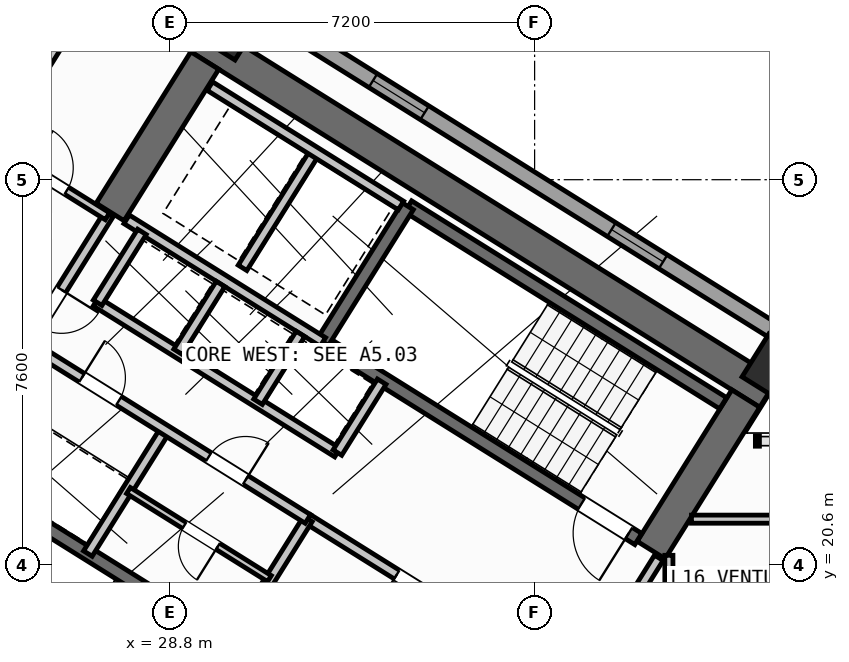
"""IFC4 building model, lengths in metres.
Left out: names, types, materials, properties, quantities, classifications, styles, units other than length and angle.
Written with IfcOpenShell. Run it as: python <this file> out.ifc"""

import sys

from ifc_helpers import new_model, si_unit, direction, frame, frame_2d, origin, origin_2d, place, context, subcontext, project, spatial, rectangle, hollow_rectangle, extrude, source, transform, mapped, element, fill, save


model = new_model("IFC4")
c1 = context("Model", 3, precision=1e-05, world=origin(), true_north=direction((0.0, 1.0)))
c2 = subcontext(c1, "Body", "Model", "MODEL_VIEW")
j1 = project(units=[si_unit("LENGTHUNIT", "METRE"), si_unit("PLANEANGLEUNIT", "RADIAN")], contexts=[c1])
p1 = place(None, origin())
s1 = spatial("IfcSite", under=j1, at=p1, CompositionType="ELEMENT")
p2 = place(p1, origin())
s2 = spatial("IfcBuilding", under=s1, at=p2, CompositionType="ELEMENT")
p3 = place(p2, frame((0.0, 0.0, 63.6)))
s3 = spatial("IfcBuildingStorey", under=s2, at=p3, CompositionType="ELEMENT", Elevation=63.6)
p4 = place(p3, frame((40.615, 23.983, 0.0), z_axis=(0.0, 0.0, 1.0), x_axis=(-0.848045953968, 0.529922692436, 0.0)))
e1 = element("IfcWall", 1, at=p4, inside=s3, PredefinedType="SHEAR", context=c2, shape_type="SweptSolid", body=[
    extrude(rectangle(XDim=13.24, YDim=0.65, at=frame_2d((6.62, 0.0))), origin(), (0.0, 0.0, 1.0), 3.35),
])
for number, where, z_axis, x_axis in (
    (2, (40.168, 23.88, 0.0), (0.0, 0.0, 1.0), (-0.53, -0.848, 0.0)),
    (3, (29.491, 30.552, 0.0), (0.0, 0.0, 1.0), (-0.53, -0.848, 0.0)),
):
    element("IfcWall", number, at=place(p3, frame(where, z_axis=z_axis, x_axis=x_axis)), inside=s3, PredefinedType="SHEAR", context=c2, shape_type="SweptSolid", body=[
        extrude(rectangle(XDim=3.525, YDim=0.65, at=frame_2d((1.763, 0.0))), origin(), (0.0, 0.0, 1.0), 3.35),
    ])
m1 = source(origin(), c2, "Body", "SweptSolid", [
    extrude(hollow_rectangle(XDim=1.0, YDim=1.0, WallThickness=0.04, at=origin_2d()), origin(), (0.0, 0.0, 1.0), 3.6),
])
for number, where, z_axis, x_axis in (
    (4, (40.783, 24.469, 0.0), (0.0, 0.0, 1.0), (-0.848, 0.53, 0.0)),
    (5, (29.928, 31.251, 0.0), (0.0, 0.0, 1.0), (-0.848, 0.53, 0.0)),
):
    element("IfcColumn", number, at=place(p3, frame(where, z_axis=z_axis, x_axis=x_axis)), inside=s3, PredefinedType="COLUMN", context=c2, shape_type="MappedRepresentation", body=[
        mapped(m1, transform((0.0, 0.0, 0.0), scale=1.0)),
    ])
p5 = place(p3, frame((29.268, 6.429, 0.0), z_axis=(0.0, 0.0, 1.0), x_axis=(-0.848049971435, 0.529916263149, 0.0)))
e6 = element("IfcWall", 6, at=p5, inside=s3, PredefinedType="STANDARD", context=c2, shape_type="SweptSolid", body=[
    extrude(rectangle(XDim=31.588, YDim=0.32, at=frame_2d((15.794, 0.0))), origin(), (0.0, 0.0, 1.0), 3.35),
])
p6 = place(p5, frame((16.362, 0.0, 0.0)))
e7 = element("IfcOpeningElement", 7, at=p6, cuts=e6, PredefinedType="OPENING", context=c2, shape_type="SweptSolid", body=[
    extrude(rectangle(XDim=1.2, YDim=2.15, at=frame_2d((0.6, 1.075))), frame((0.0, 0.17, 0.0), z_axis=(0.0, -1.0, 0.0), x_axis=(1.0, 0.0, 0.0)), (0.0, 0.0, 1.0), 0.34),
])
p7 = place(p5, frame((2.989, 0.0, 0.8)))
e8 = element("IfcOpeningElement", 8, at=p7, cuts=e6, PredefinedType="OPENING", context=c2, shape_type="SweptSolid", body=[
    extrude(rectangle(XDim=2.1, YDim=1.55, at=frame_2d((1.05, 0.775))), frame((0.0, 0.17, 0.0), z_axis=(0.0, -1.0, 0.0), x_axis=(1.0, 0.0, 0.0)), (0.0, 0.0, 1.0), 0.34),
])
p8 = place(p5, frame((8.359, 0.0, 0.8)))
e9 = element("IfcOpeningElement", 9, at=p8, cuts=e6, PredefinedType="OPENING", context=c2, shape_type="SweptSolid", body=[
    extrude(rectangle(XDim=2.1, YDim=1.55, at=frame_2d((1.05, 0.775))), frame((0.0, 0.17, 0.0), z_axis=(0.0, -1.0, 0.0), x_axis=(1.0, 0.0, 0.0)), (0.0, 0.0, 1.0), 0.34),
])
p9 = place(p5, frame((13.284, 0.0, 0.95)))
e10 = element("IfcOpeningElement", 10, at=p9, cuts=e6, PredefinedType="OPENING", context=c2, shape_type="SweptSolid", body=[
    extrude(rectangle(XDim=1.2, YDim=1.4, at=frame_2d((0.6, 0.7))), frame((0.0, 0.17, 0.0), z_axis=(0.0, -1.0, 0.0), x_axis=(1.0, 0.0, 0.0)), (0.0, 0.0, 1.0), 0.34),
])
p10 = place(p5, frame((29.188, 0.0, 0.95)))
e11 = element("IfcOpeningElement", 11, at=p10, cuts=e6, PredefinedType="OPENING", context=c2, shape_type="SweptSolid", body=[
    extrude(rectangle(XDim=1.2, YDim=1.4, at=frame_2d((0.6, 0.7))), frame((0.0, 0.17, 0.0), z_axis=(0.0, -1.0, 0.0), x_axis=(1.0, 0.0, 0.0)), (0.0, 0.0, 1.0), 0.34),
])
p11 = place(p5, frame((19.11, 0.0, 1.0)))
e12 = element("IfcOpeningElement", 12, at=p11, cuts=e6, PredefinedType="OPENING", context=c2, shape_type="SweptSolid", body=[
    extrude(rectangle(XDim=0.9, YDim=1.25, at=frame_2d((0.45, 0.625))), frame((0.0, 0.17, 0.0), z_axis=(0.0, -1.0, 0.0), x_axis=(1.0, 0.0, 0.0)), (0.0, 0.0, 1.0), 0.34),
])
p12 = place(p5, frame((21.226, 0.0, 1.0)))
e13 = element("IfcOpeningElement", 13, at=p12, cuts=e6, PredefinedType="OPENING", context=c2, shape_type="SweptSolid", body=[
    extrude(rectangle(XDim=0.9, YDim=1.25, at=frame_2d((0.45, 0.625))), frame((0.0, 0.17, 0.0), z_axis=(0.0, -1.0, 0.0), x_axis=(1.0, 0.0, 0.0)), (0.0, 0.0, 1.0), 0.34),
])
p13 = place(p5, frame((23.014, 0.0, 1.0)))
e14 = element("IfcOpeningElement", 14, at=p13, cuts=e6, PredefinedType="OPENING", context=c2, shape_type="SweptSolid", body=[
    extrude(rectangle(XDim=0.9, YDim=1.25, at=frame_2d((0.45, 0.625))), frame((0.0, 0.17, 0.0), z_axis=(0.0, -1.0, 0.0), x_axis=(1.0, 0.0, 0.0)), (0.0, 0.0, 1.0), 0.34),
])
p14 = place(p5, frame((24.802, 0.0, 1.0)))
e15 = element("IfcOpeningElement", 15, at=p14, cuts=e6, PredefinedType="OPENING", context=c2, shape_type="SweptSolid", body=[
    extrude(rectangle(XDim=0.9, YDim=1.25, at=frame_2d((0.45, 0.625))), frame((0.0, 0.17, 0.0), z_axis=(0.0, -1.0, 0.0), x_axis=(1.0, 0.0, 0.0)), (0.0, 0.0, 1.0), 0.34),
])
p15 = place(p5, frame((26.59, 0.0, 1.0)))
e16 = element("IfcOpeningElement", 16, at=p15, cuts=e6, PredefinedType="OPENING", context=c2, shape_type="SweptSolid", body=[
    extrude(rectangle(XDim=0.9, YDim=1.25, at=frame_2d((0.45, 0.625))), frame((0.0, 0.17, 0.0), z_axis=(0.0, -1.0, 0.0), x_axis=(1.0, 0.0, 0.0)), (0.0, 0.0, 1.0), 0.34),
])
p16 = place(p3, frame((14.138, 41.825, 0.0), z_axis=(0.0, 0.0, 1.0), x_axis=(0.848046498049, -0.529921821731, 0.0)))
e17 = element("IfcWall", 17, at=p16, inside=s3, PredefinedType="STANDARD", context=c2, shape_type="SweptSolid", body=[
    extrude(rectangle(XDim=31.588, YDim=0.32, at=frame_2d((15.794, 0.0))), origin(), (0.0, 0.0, 1.0), 3.35),
])
p17 = place(p16, frame((2.526, 0.0, 0.0)))
e18 = element("IfcOpeningElement", 18, at=p17, cuts=e17, PredefinedType="OPENING", context=c2, shape_type="SweptSolid", body=[
    extrude(rectangle(XDim=1.05, YDim=2.15, at=frame_2d((0.525, 1.075))), frame((0.0, 0.17, 0.0), z_axis=(0.0, -1.0, 0.0), x_axis=(1.0, 0.0, 0.0)), (0.0, 0.0, 1.0), 0.34),
])
p18 = place(p16, frame((0.825, 0.0, 0.95)))
e19 = element("IfcOpeningElement", 19, at=p18, cuts=e17, PredefinedType="OPENING", context=c2, shape_type="SweptSolid", body=[
    extrude(rectangle(XDim=1.2, YDim=1.4, at=frame_2d((0.6, 0.7))), frame((0.0, 0.17, 0.0), z_axis=(0.0, -1.0, 0.0), x_axis=(1.0, 0.0, 0.0)), (0.0, 0.0, 1.0), 0.34),
])
p19 = place(p16, frame((9.502, 0.0, 0.85)))
e20 = element("IfcOpeningElement", 20, at=p19, cuts=e17, PredefinedType="OPENING", context=c2, shape_type="SweptSolid", body=[
    extrude(rectangle(XDim=1.8, YDim=1.5, at=frame_2d((0.9, 0.75))), frame((0.0, 0.17, 0.0), z_axis=(0.0, -1.0, 0.0), x_axis=(1.0, 0.0, 0.0)), (0.0, 0.0, 1.0), 0.34),
])
p20 = place(p16, frame((13.899, 0.0, 0.85)))
e21 = element("IfcOpeningElement", 21, at=p20, cuts=e17, PredefinedType="OPENING", context=c2, shape_type="SweptSolid", body=[
    extrude(rectangle(XDim=1.5, YDim=1.5, at=frame_2d((0.75, 0.75))), frame((0.0, 0.17, 0.0), z_axis=(0.0, -1.0, 0.0), x_axis=(1.0, 0.0, 0.0)), (0.0, 0.0, 1.0), 0.34),
])
p21 = place(p16, frame((22.019, 0.0, 0.95)))
e22 = element("IfcOpeningElement", 22, at=p21, cuts=e17, PredefinedType="OPENING", context=c2, shape_type="SweptSolid", body=[
    extrude(rectangle(XDim=1.2, YDim=1.4, at=frame_2d((0.6, 0.7))), frame((0.0, 0.17, 0.0), z_axis=(0.0, -1.0, 0.0), x_axis=(1.0, 0.0, 0.0)), (0.0, 0.0, 1.0), 0.34),
])
p22 = place(p16, frame((27.569, 0.0, 0.95)))
e23 = element("IfcOpeningElement", 23, at=p22, cuts=e17, PredefinedType="OPENING", context=c2, shape_type="SweptSolid", body=[
    extrude(rectangle(XDim=1.2, YDim=1.4, at=frame_2d((0.6, 0.7))), frame((0.0, 0.17, 0.0), z_axis=(0.0, -1.0, 0.0), x_axis=(1.0, 0.0, 0.0)), (0.0, 0.0, 1.0), 0.34),
])
p23 = place(p3, frame((31.28, 18.261, 0.0), z_axis=(0.0, 0.0, 1.0), x_axis=(-0.848051618787, 0.529913626805, 0.0)))
e24 = element("IfcWall", 24, at=p23, inside=s3, PredefinedType="SHEAR", context=c2, shape_type="SweptSolid", body=[
    extrude(rectangle(XDim=7.46, YDim=0.26, at=frame_2d((3.73, 0.0))), origin(), (0.0, 0.0, 1.0), 3.35),
])
p24 = place(p23, frame((0.36, 0.0, 0.0)))
e25 = element("IfcOpeningElement", 25, at=p24, cuts=e24, PredefinedType="OPENING", context=c2, shape_type="SweptSolid", body=[
    extrude(rectangle(XDim=0.86, YDim=2.05, at=frame_2d((0.43, 1.025))), frame((0.0, 0.14, 0.0), z_axis=(0.0, -1.0, 0.0), x_axis=(1.0, 0.0, 0.0)), (0.0, 0.0, 1.0), 0.28),
])
p25 = place(p3, frame((39.721, 23.788, 0.0), z_axis=(0.0, 0.0, 1.0), x_axis=(-0.848054434086, 0.529909121291, 0.0)))
e26 = element("IfcWall", 26, at=p25, inside=s3, PredefinedType="SHEAR", context=c2, shape_type="SweptSolid", body=[
    extrude(rectangle(XDim=7.33, YDim=0.26, at=frame_2d((3.665, 0.0))), origin(), (0.0, 0.0, 1.0), 3.35),
])
p26 = place(p3, frame((38.046, 21.108, 0.0), z_axis=(0.0, 0.0, 1.0), x_axis=(-0.848054434086, 0.529909121291, 0.0)))
e27 = element("IfcWall", 27, at=p26, inside=s3, PredefinedType="SHEAR", context=c2, shape_type="SweptSolid", body=[
    extrude(rectangle(XDim=7.33, YDim=0.26, at=frame_2d((3.665, 0.0))), origin(), (0.0, 0.0, 1.0), 3.35),
])
p27 = place(p26, frame((0.22, 0.0, 0.0)))
e28 = element("IfcOpeningElement", 28, at=p27, cuts=e27, PredefinedType="OPENING", context=c2, shape_type="SweptSolid", body=[
    extrude(rectangle(XDim=1.1, YDim=2.1, at=frame_2d((0.55, 1.05))), frame((0.0, 0.14, 0.0), z_axis=(0.0, -1.0, 0.0), x_axis=(1.0, 0.0, 0.0)), (0.0, 0.0, 1.0), 0.28),
])
p28 = place(p3, frame((33.496, 27.677, 0.0), z_axis=(0.0, 0.0, 1.0), x_axis=(-0.529908658664, -0.84805472316, 0.0)))
e29 = element("IfcWall", 29, at=p28, inside=s3, PredefinedType="SHEAR", context=c2, shape_type="SweptSolid", body=[
    extrude(rectangle(XDim=3.16, YDim=0.26, at=frame_2d((1.58, 0.0))), origin(), (0.0, 0.0, 1.0), 3.35),
])
p29 = place(p3, frame((36.374, 18.474, 0.0), z_axis=(0.0, 0.0, 1.0), x_axis=(-0.848051071577, 0.529914502535, 0.0)))
e30 = element("IfcWall", 30, at=p29, inside=s3, PredefinedType="STANDARD", context=c2, shape_type="SweptSolid", body=[
    extrude(rectangle(XDim=5.718, YDim=0.2, at=frame_2d((2.859, 0.0))), origin(), (0.0, 0.0, 1.0), 3.34),
])
p30 = place(p29, frame((2.498, 0.0, 0.0)))
e31 = element("IfcOpeningElement", 31, at=p30, cuts=e30, PredefinedType="OPENING", context=c2, shape_type="SweptSolid", body=[
    extrude(rectangle(XDim=1.15, YDim=2.1, at=frame_2d((0.575, 1.05))), frame((0.0, 0.11, 0.0), z_axis=(0.0, -1.0, 0.0), x_axis=(1.0, 0.0, 0.0)), (0.0, 0.0, 1.0), 0.22),
])
p31 = place(p3, frame((31.822, 24.998, 0.0), z_axis=(0.0, 0.0, 1.0), x_axis=(-0.848058348634, 0.529902856485, 0.0)))
e32 = element("IfcWall", 32, at=p31, inside=s3, PredefinedType="STANDARD", context=c2, shape_type="SweptSolid", body=[
    extrude(rectangle(XDim=4.568, YDim=0.2, at=frame_2d((2.284, 0.0))), origin(), (0.0, 0.0, 1.0), 3.34),
])
p32 = place(p3, frame((32.108, 22.814, 0.0), z_axis=(0.0, 0.0, 1.0), x_axis=(-0.848042229521, 0.529928652696, 0.0)))
e33 = element("IfcWall", 33, at=p32, inside=s3, PredefinedType="STANDARD", context=c2, shape_type="SweptSolid", body=[
    extrude(rectangle(XDim=5.62, YDim=0.2, at=frame_2d((2.81, 0.0))), origin(), (0.0, 0.0, 1.0), 3.34),
])
p33 = place(p3, frame((32.982, 24.213, 0.0), z_axis=(0.0, 0.0, 1.0), x_axis=(-0.529839334948, -0.84809803628, 0.0)))
e34 = element("IfcWall", 34, at=p33, inside=s3, PredefinedType="STANDARD", context=c2, shape_type="SweptSolid", body=[
    extrude(rectangle(XDim=1.65, YDim=0.2, at=frame_2d((0.825, 0.0))), origin(), (0.0, 0.0, 1.0), 3.34),
])
p34 = place(p3, frame((28.25, 27.17, 0.0), z_axis=(0.0, 0.0, 1.0), x_axis=(-0.529905827651, -0.848056492117, 0.0)))
e35 = element("IfcWall", 35, at=p34, inside=s3, PredefinedType="STANDARD", context=c2, shape_type="SweptSolid", body=[
    extrude(rectangle(XDim=1.65, YDim=0.2, at=frame_2d((0.825, 0.0))), origin(), (0.0, 0.0, 1.0), 3.34),
])
p35 = place(p3, frame((31.645, 28.716, 0.0), z_axis=(0.0, 0.0, 1.0), x_axis=(-0.52986693015, -0.848080795876, 0.0)))
e36 = element("IfcWall", 36, at=p35, inside=s3, PredefinedType="STANDARD", context=c2, shape_type="SweptSolid", body=[
    extrude(rectangle(XDim=2.66, YDim=0.2, at=frame_2d((1.33, 0.0))), origin(), (0.0, 0.0, 1.0), 3.34),
])
p36 = place(p3, frame((33.363, 27.69, 0.0), z_axis=(0.0, 0.0, 1.0), x_axis=(-0.848053806312, 0.529910125964, 0.0)))
e37 = element("IfcWall", 37, at=p36, inside=s3, PredefinedType="STANDARD", context=c2, shape_type="SweptSolid", body=[
    extrude(rectangle(XDim=4.448, YDim=0.2, at=frame_2d((2.224, 0.0))), origin(), (0.0, 0.0, 1.0), 3.34),
])
for number, where, z_axis, x_axis in (
    (38, (31.379, 25.156, 0.0), (0.0, 0.0, 1.0), (-0.53, -0.848, 0.0)),
    (39, (29.801, 26.142, 0.0), (0.0, 0.0, 1.0), (-0.53, -0.848, 0.0)),
):
    element("IfcWall", number, at=place(p3, frame(where, z_axis=z_axis, x_axis=x_axis)), inside=s3, PredefinedType="STANDARD", context=c2, shape_type="SweptSolid", body=[
        extrude(rectangle(XDim=1.58, YDim=0.2, at=frame_2d((0.79, 0.0))), origin(), (0.0, 0.0, 1.0), 3.34),
    ])
for number, where, z_axis, x_axis in (
    (40, (31.525, 21.504, 0.0), (0.0, 0.0, 1.0), (-0.53, -0.848, 0.0)),
    (41, (28.71, 23.263, 0.0), (0.0, 0.0, 1.0), (-0.53, -0.848, 0.0)),
):
    element("IfcWall", number, at=place(p3, frame(where, z_axis=z_axis, x_axis=x_axis)), inside=s3, PredefinedType="STANDARD", context=c2, shape_type="SweptSolid", body=[
        extrude(rectangle(XDim=2.88, YDim=0.2, at=frame_2d((1.44, 0.0))), origin(), (0.0, 0.0, 1.0), 3.34),
    ])
p37 = place(p3, frame((31.525, 21.504, 0.0), z_axis=(0.0, 0.0, 1.0), x_axis=(-0.848044998614, 0.529924221305, 0.0)))
e42 = element("IfcWall", 42, at=p37, inside=s3, PredefinedType="STANDARD", context=c2, shape_type="SweptSolid", body=[
    extrude(rectangle(XDim=6.168, YDim=0.2, at=frame_2d((3.084, 0.0))), origin(), (0.0, 0.0, 1.0), 3.34),
])
p38 = place(p37, frame((4.4, 0.0, 0.0)))
e43 = element("IfcOpeningElement", 43, at=p38, cuts=e42, PredefinedType="OPENING", context=c2, shape_type="SweptSolid", body=[
    extrude(rectangle(XDim=0.86, YDim=2.05, at=frame_2d((0.43, 1.025))), frame((0.0, 0.11, 0.0), z_axis=(0.0, -1.0, 0.0), x_axis=(1.0, 0.0, 0.0)), (0.0, 0.0, 1.0), 0.22),
])
p39 = place(p37, frame((1.45, 0.0, 0.0)))
e44 = element("IfcOpeningElement", 44, at=p39, cuts=e42, PredefinedType="OPENING", context=c2, shape_type="SweptSolid", body=[
    extrude(rectangle(XDim=0.86, YDim=2.05, at=frame_2d((0.43, 1.025))), frame((0.0, 0.11, 0.0), z_axis=(0.0, -1.0, 0.0), x_axis=(1.0, 0.0, 0.0)), (0.0, 0.0, 1.0), 0.22),
])
p40 = place(p3, frame((30.766, 20.327, 0.0), z_axis=(0.0, 0.0, 1.0), x_axis=(-0.848052663127, 0.529911955482, 0.0)))
e45 = element("IfcWall", 45, at=p40, inside=s3, PredefinedType="PLUMBINGWALL", context=c2, shape_type="SweptSolid", body=[
    extrude(rectangle(XDim=3.28, YDim=0.14, at=frame_2d((1.64, 0.0))), origin(), (0.0, 0.0, 1.0), 3.34),
])
p41 = place(p40, frame((1.2, 0.0, 0.0)))
e46 = element("IfcOpeningElement", 46, at=p41, cuts=e45, PredefinedType="OPENING", context=c2, shape_type="SweptSolid", body=[
    extrude(rectangle(XDim=0.78, YDim=2.05, at=frame_2d((0.39, 1.025))), frame((0.0, 0.08, 0.0), z_axis=(0.0, -1.0, 0.0), x_axis=(1.0, 0.0, 0.0)), (0.0, 0.0, 1.0), 0.16),
])
p42 = place(p3, frame((27.596, 27.52, 0.0), z_axis=(0.0, 0.0, 1.0), x_axis=(-0.529865479138, -0.848081702443, 0.0)))
e47 = element("IfcWall", 47, at=p42, inside=s3, PredefinedType="STANDARD", context=c2, shape_type="SweptSolid", body=[
    extrude(rectangle(XDim=2.96, YDim=0.2, at=frame_2d((1.48, 0.0))), origin(), (0.0, 0.0, 1.0), 3.34),
])
p43 = place(p42, frame((1.76, 0.0, 0.0)))
e48 = element("IfcOpeningElement", 48, at=p43, cuts=e47, PredefinedType="OPENING", context=c2, shape_type="SweptSolid", body=[
    extrude(rectangle(XDim=0.86, YDim=2.05, at=frame_2d((0.43, 1.025))), frame((0.0, 0.11, 0.0), z_axis=(0.0, -1.0, 0.0), x_axis=(1.0, 0.0, 0.0)), (0.0, 0.0, 1.0), 0.22),
])
p44 = place(p3, frame((27.57, 27.478, 0.0), z_axis=(0.0, 0.0, 1.0), x_axis=(-0.848050851465, 0.529914854792, 0.0)))
e49 = element("IfcWall", 49, at=p44, inside=s3, PredefinedType="PARTITIONING", context=c2, shape_type="SweptSolid", body=[
    extrude(rectangle(XDim=2.61, YDim=0.16, at=frame_2d((1.305, 0.0))), origin(), (0.0, 0.0, 1.0), 3.34),
])
p45 = place(p44, frame((0.95, 0.0, 0.0)))
e50 = element("IfcOpeningElement", 50, at=p45, cuts=e49, PredefinedType="OPENING", context=c2, shape_type="SweptSolid", body=[
    extrude(rectangle(XDim=0.86, YDim=2.05, at=frame_2d((0.43, 1.025))), frame((0.0, 0.09, 0.0), z_axis=(0.0, -1.0, 0.0), x_axis=(1.0, 0.0, 0.0)), (0.0, 0.0, 1.0), 0.18),
])
p46 = place(p3, frame((27.953, 33.016, 0.0), z_axis=(0.0, 0.0, 1.0), x_axis=(-0.529906322364, -0.848056182997, 0.0)))
e51 = element("IfcWall", 51, at=p46, inside=s3, PredefinedType="PARTITIONING", context=c2, shape_type="SweptSolid", body=[
    extrude(rectangle(XDim=5.45, YDim=0.16, at=frame_2d((2.725, 0.0))), origin(), (0.0, 0.0, 1.0), 3.34),
])
p47 = place(p3, frame((38.451, 20.737, 0.0), z_axis=(0.0, 0.0, 1.0), x_axis=(-0.529924799939, -0.848044637038, 0.0)))
e52 = element("IfcWall", 52, at=p47, inside=s3, PredefinedType="STANDARD", context=c2, shape_type="SweptSolid", body=[
    extrude(rectangle(XDim=2.96, YDim=0.2, at=frame_2d((1.48, 0.0))), origin(), (0.0, 0.0, 1.0), 3.34),
])
p48 = place(p47, frame((1.46, 0.0, 0.0)))
e53 = element("IfcOpeningElement", 53, at=p48, cuts=e52, PredefinedType="OPENING", context=c2, shape_type="SweptSolid", body=[
    extrude(rectangle(XDim=0.86, YDim=2.05, at=frame_2d((0.43, 1.025))), frame((0.0, 0.11, 0.0), z_axis=(0.0, -1.0, 0.0), x_axis=(1.0, 0.0, 0.0)), (0.0, 0.0, 1.0), 0.22),
])
p49 = place(p3, frame((38.65, 17.93, 0.0), z_axis=(0.0, 0.0, 1.0), x_axis=(0.0, 1.0, 0.0)))
e54 = element("IfcWall", 54, at=p49, inside=s3, PredefinedType="PARTITIONING", context=c2, shape_type="SweptSolid", body=[
    extrude(rectangle(XDim=2.857, YDim=0.16, at=frame_2d((1.428, 0.0))), origin(), (0.0, 0.0, 1.0), 3.34),
])
p50 = place(p3, frame((39.095, 21.5, 0.0), z_axis=(0.0, 0.0, 1.0), x_axis=(1.0, 0.0, 0.0)))
e55 = element("IfcWall", 55, at=p50, inside=s3, PredefinedType="PARTITIONING", context=c2, shape_type="SweptSolid", body=[
    extrude(rectangle(XDim=7.094, YDim=0.16, at=frame_2d((3.547, 0.0))), origin(), (0.0, 0.0, 1.0), 3.34),
])
m2 = source(origin(), c2, "Body", "SweptSolid", [
    extrude(rectangle(XDim=1.2, YDim=1.4, at=frame_2d((0.6, 0.7))), frame((0.0, 0.03, 0.0), z_axis=(0.0, -1.0, 0.0), x_axis=(1.0, 0.0, 0.0)), (0.0, 0.0, 1.0), 0.06),
])
p51 = place(p21, origin())
e56 = element("IfcWindow", 56, at=p51, inside=s3, PartitioningType="SINGLE_PANEL", PredefinedType="WINDOW", context=c2, shape_type="MappedRepresentation", body=[
    mapped(m2, transform((0.0, 0.0, 0.0), scale=1.0)),
])
fill(e22, e56)
p52 = place(p22, origin())
e57 = element("IfcWindow", 57, at=p52, inside=s3, PartitioningType="SINGLE_PANEL", PredefinedType="WINDOW", context=c2, shape_type="MappedRepresentation", body=[
    mapped(m2, transform((0.0, 0.0, 0.0), scale=1.0)),
])
fill(e23, e57)
m3 = source(origin(), c2, "Body", "SweptSolid", [
    extrude(rectangle(XDim=1.1, YDim=2.1, at=frame_2d((0.55, 1.05))), frame((0.0, 0.025, 0.0), z_axis=(0.0, -1.0, 0.0), x_axis=(1.0, 0.0, 0.0)), (0.0, 0.0, 1.0), 0.05),
])
p53 = place(p27, origin())
e58 = element("IfcDoor", 58, at=p53, inside=s3, OperationType="SINGLE_SWING_LEFT", PredefinedType="DOOR", context=c2, shape_type="MappedRepresentation", body=[
    mapped(m3, transform((0.0, 0.0, 0.0), scale=1.0)),
])
fill(e28, e58)
m4 = source(origin(), c2, "Body", "SweptSolid", [
    extrude(rectangle(XDim=1.15, YDim=2.1, at=frame_2d((0.575, 1.05))), frame((0.0, 0.025, 0.0), z_axis=(0.0, -1.0, 0.0), x_axis=(1.0, 0.0, 0.0)), (0.0, 0.0, 1.0), 0.05),
])
p54 = place(p30, origin())
e59 = element("IfcDoor", 59, at=p54, inside=s3, OperationType="SINGLE_SWING_RIGHT", PredefinedType="DOOR", context=c2, shape_type="MappedRepresentation", body=[
    mapped(m4, transform((0.0, 0.0, 0.0), scale=1.0)),
])
fill(e31, e59)
m5 = source(origin(), c2, "Body", "SweptSolid", [
    extrude(rectangle(XDim=0.86, YDim=2.05, at=frame_2d((0.43, 1.025))), frame((0.0, 0.025, 0.0), z_axis=(0.0, -1.0, 0.0), x_axis=(1.0, 0.0, 0.0)), (0.0, 0.0, 1.0), 0.05),
])
p55 = place(p38, frame((0.86, 0.0, 0.0), z_axis=(0.0, 0.0, 1.0), x_axis=(-1.0, 0.0, 0.0)))
e60 = element("IfcDoor", 60, at=p55, inside=s3, OperationType="SINGLE_SWING_LEFT", PredefinedType="DOOR", context=c2, shape_type="MappedRepresentation", body=[
    mapped(m5, transform((0.0, 0.0, 0.0), scale=1.0)),
])
fill(e43, e60)
p56 = place(p39, frame((0.86, 0.0, 0.0), z_axis=(0.0, 0.0, 1.0), x_axis=(-1.0, 0.0, 0.0)))
e61 = element("IfcDoor", 61, at=p56, inside=s3, OperationType="SINGLE_SWING_RIGHT", PredefinedType="DOOR", context=c2, shape_type="MappedRepresentation", body=[
    mapped(m5, transform((0.0, 0.0, 0.0), scale=1.0)),
])
fill(e44, e61)
m6 = source(origin(), c2, "Body", "SweptSolid", [
    extrude(rectangle(XDim=0.78, YDim=2.05, at=frame_2d((0.39, 1.025))), frame((0.0, 0.025, 0.0), z_axis=(0.0, -1.0, 0.0), x_axis=(1.0, 0.0, 0.0)), (0.0, 0.0, 1.0), 0.05),
])
p57 = place(p41, origin())
e62 = element("IfcDoor", 62, at=p57, inside=s3, OperationType="SINGLE_SWING_LEFT", PredefinedType="DOOR", context=c2, shape_type="MappedRepresentation", body=[
    mapped(m6, transform((0.0, 0.0, 0.0), scale=1.0)),
])
fill(e46, e62)
p58 = place(p45, frame((0.86, 0.0, 0.0), z_axis=(0.0, 0.0, 1.0), x_axis=(-1.0, 0.0, 0.0)))
e63 = element("IfcDoor", 63, at=p58, inside=s3, OperationType="SINGLE_SWING_LEFT", PredefinedType="DOOR", context=c2, shape_type="MappedRepresentation", body=[
    mapped(m5, transform((0.0, 0.0, 0.0), scale=1.0)),
])
fill(e50, e63)
p59 = place(p43, origin())
e64 = element("IfcDoor", 64, at=p59, inside=s3, OperationType="SINGLE_SWING_LEFT", PredefinedType="DOOR", context=c2, shape_type="MappedRepresentation", body=[
    mapped(m5, transform((0.0, 0.0, 0.0), scale=1.0)),
])
fill(e48, e64)
save(model, sys.argv[1])
